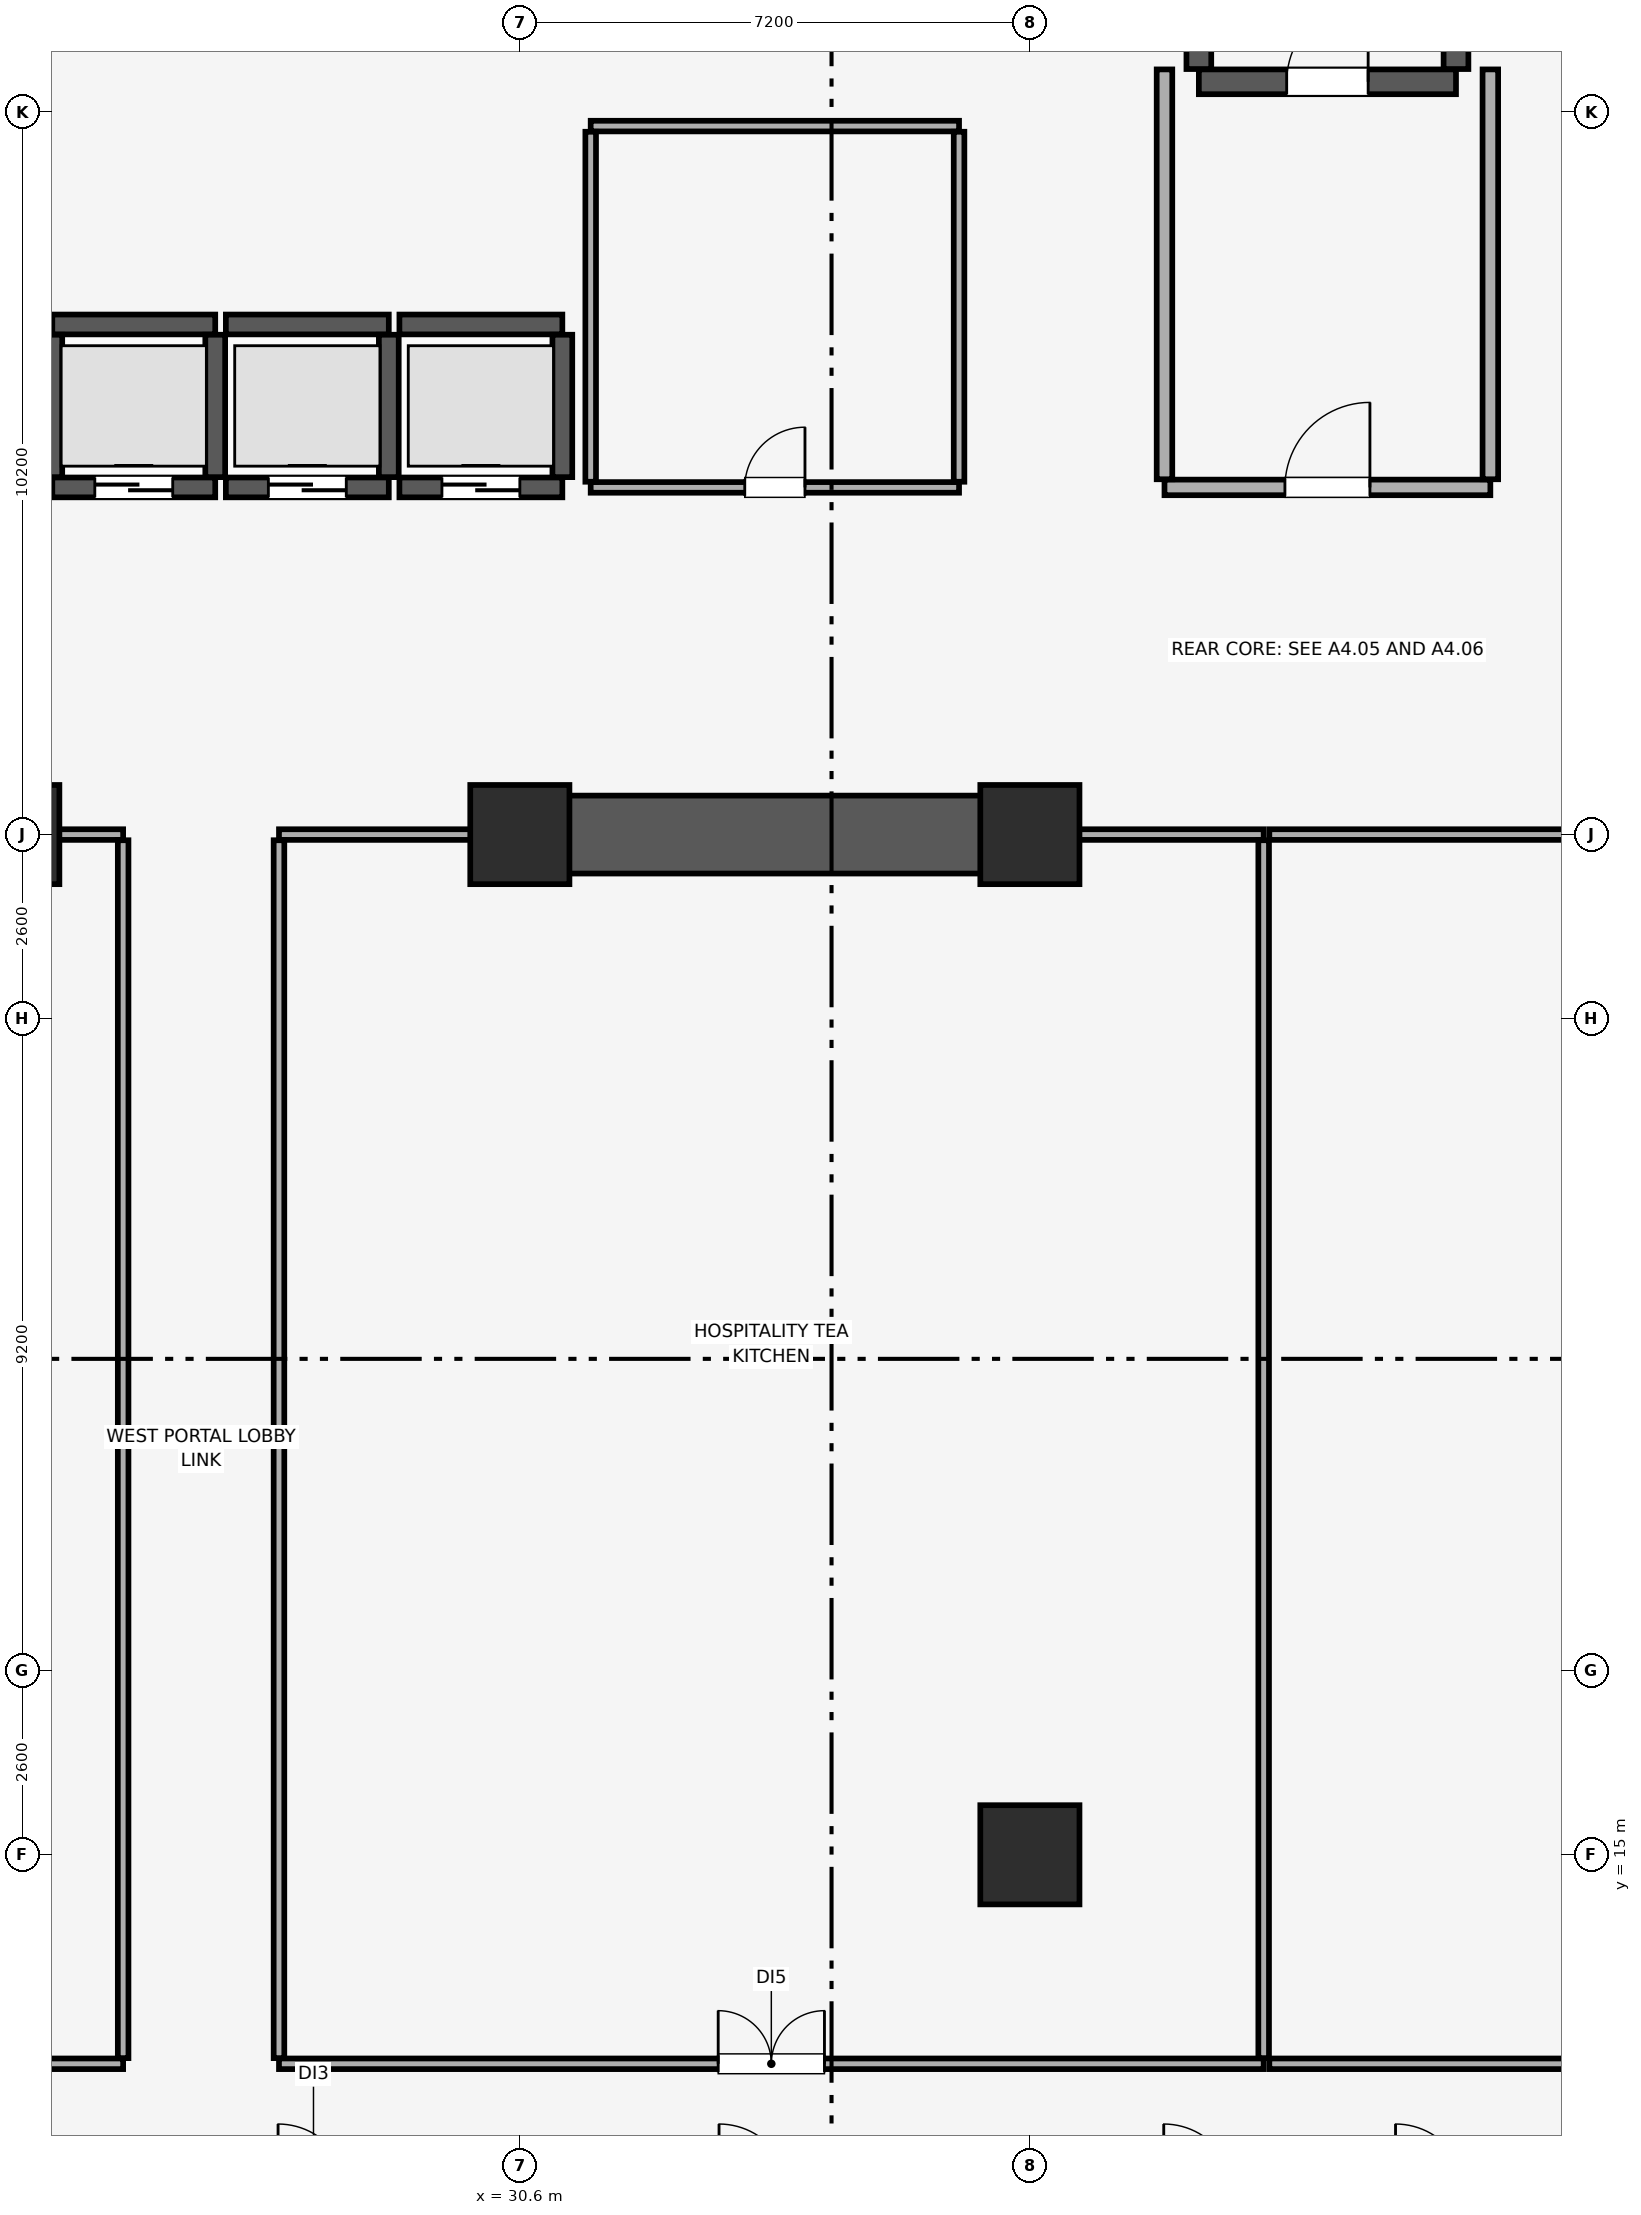
"""IFC4 building model, lengths in metres.
Left out: names, types, materials, properties, quantities, classifications, styles, units other than length and angle.
Written with IfcOpenShell. Run it as: python <this file> out.ifc"""

import sys

from ifc_helpers import new_model, si_unit, direction, frame, frame_2d, origin, origin_2d, place, context, subcontext, project, spatial, rectangle, extrude, element, fill, save


model = new_model("IFC4")
c1 = context("Model", 3, precision=1e-05, world=origin(), true_north=direction((0.0, 1.0)))
c2 = subcontext(c1, "Body", "Model", "MODEL_VIEW")
j1 = project(units=[si_unit("LENGTHUNIT", "METRE"), si_unit("PLANEANGLEUNIT", "RADIAN")], contexts=[c1])
p1 = place(None, origin())
s1 = spatial("IfcSite", under=j1, at=p1, CompositionType="ELEMENT")
p2 = place(p1, origin())
s2 = spatial("IfcBuilding", under=s1, at=p2, CompositionType="ELEMENT")
p3 = place(p2, frame((0.0, 0.0, 46.4)))
s3 = spatial("IfcBuildingStorey", under=s2, at=p3, CompositionType="ELEMENT", Elevation=46.4)
for number, where, z_axis, x_axis in (
    (1, (37.8, 15.0, 0.0), (0.0, 0.0, 1.0), (1.0, 0.0, 0.0)),
    (2, (23.4, 29.4, 0.0), (0.0, 0.0, 1.0), (1.0, 0.0, 0.0)),
    (3, (30.6, 29.4, 0.0), (0.0, 0.0, 1.0), (1.0, 0.0, 0.0)),
    (4, (37.8, 29.4, 0.0), (0.0, 0.0, 1.0), (1.0, 0.0, 0.0)),
):
    element("IfcColumn", number, at=place(p3, frame(where, z_axis=z_axis, x_axis=x_axis)), inside=s3, PredefinedType="COLUMN", context=c2, shape_type="SweptSolid", body=[
        extrude(rectangle(XDim=1.4, YDim=1.4, at=origin_2d()), origin(), (0.0, 0.0, 1.0), 3.51),
    ])
p4 = place(p3, frame((30.4, 29.4, 0.0), z_axis=(0.0, 0.0, 1.0), x_axis=(1.0, 0.0, 0.0)))
e5 = element("IfcWall", 5, at=p4, inside=s3, PredefinedType="SHEAR", context=c2, shape_type="SweptSolid", body=[
    extrude(rectangle(XDim=7.6, YDim=1.1, at=frame_2d((3.8, 0.0))), origin(), (0.0, 0.0, 1.0), 3.51),
])
p5 = place(p3, frame((40.185, 40.025, 0.0), z_axis=(0.0, 0.0, 1.0), x_axis=(1.0, 0.0, 0.0)))
e6 = element("IfcWall", 6, at=p5, inside=s3, PredefinedType="SHEAR", context=c2, shape_type="SweptSolid", body=[
    extrude(rectangle(XDim=3.63, YDim=0.35, at=frame_2d((1.815, 0.0))), origin(), (0.0, 0.0, 1.0), 3.51),
])
p6 = place(p5, frame((1.24, 0.0, 0.0)))
e7 = element("IfcOpeningElement", 7, at=p6, cuts=e6, PredefinedType="OPENING", context=c2, shape_type="SweptSolid", body=[
    extrude(rectangle(XDim=1.15, YDim=2.15, at=frame_2d((0.575, 1.075))), frame((0.0, 0.185, 0.0), z_axis=(0.0, -1.0, 0.0), x_axis=(1.0, 0.0, 0.0)), (0.0, 0.0, 1.0), 0.37),
])
for number, where, z_axis, x_axis in (
    (8, (40.185, 40.205, 0.0), (0.0, 0.0, 1.0), (0.0, 1.0, 0.0)),
    (9, (43.815, 40.205, 0.0), (0.0, 0.0, 1.0), (0.0, 1.0, 0.0)),
):
    element("IfcWall", number, at=place(p3, frame(where, z_axis=z_axis, x_axis=x_axis)), inside=s3, PredefinedType="SHEAR", context=c2, shape_type="SweptSolid", body=[
        extrude(rectangle(XDim=8.09, YDim=0.35, at=frame_2d((4.045, 0.0))), origin(), (0.0, 0.0, 1.0), 3.51),
    ])
p7 = place(p3, frame((24.0, 34.3, 0.0), z_axis=(0.0, 0.0, 1.0), x_axis=(1.0, 0.0, 0.0)))
e10 = element("IfcWall", 10, at=p7, inside=s3, PredefinedType="SHEAR", context=c2, shape_type="SweptSolid", body=[
    extrude(rectangle(XDim=2.3, YDim=0.28, at=frame_2d((1.15, 0.0))), origin(), (0.0, 0.0, 1.0), 3.51),
])
p8 = place(p7, frame((0.6, 0.0, 0.0)))
e11 = element("IfcOpeningElement", 11, at=p8, cuts=e10, PredefinedType="OPENING", context=c2, shape_type="SweptSolid", body=[
    extrude(rectangle(XDim=1.1, YDim=2.2, at=frame_2d((0.55, 1.1))), frame((0.0, 0.15, 0.0), z_axis=(0.0, -1.0, 0.0), x_axis=(1.0, 0.0, 0.0)), (0.0, 0.0, 1.0), 0.3),
])
p9 = place(p3, frame((24.0, 36.6, 0.0), z_axis=(0.0, 0.0, 1.0), x_axis=(1.0, 0.0, 0.0)))
e12 = element("IfcWall", 12, at=p9, inside=s3, PredefinedType="SHEAR", context=c2, shape_type="SweptSolid", body=[
    extrude(rectangle(XDim=2.3, YDim=0.28, at=frame_2d((1.15, 0.0))), origin(), (0.0, 0.0, 1.0), 3.51),
])
for number, where, z_axis, x_axis in (
    (13, (24.0, 34.445, 0.0), (0.0, 0.0, 1.0), (0.0, 1.0, 0.0)),
    (14, (26.3, 34.445, 0.0), (0.0, 0.0, 1.0), (0.0, 1.0, 0.0)),
):
    element("IfcWall", number, at=place(p3, frame(where, z_axis=z_axis, x_axis=x_axis)), inside=s3, PredefinedType="SHEAR", context=c2, shape_type="SweptSolid", body=[
        extrude(rectangle(XDim=2.01, YDim=0.28, at=frame_2d((1.005, 0.0))), origin(), (0.0, 0.0, 1.0), 3.51),
    ])
p10 = place(p3, frame((26.45, 34.3, 0.0), z_axis=(0.0, 0.0, 1.0), x_axis=(1.0, 0.0, 0.0)))
e15 = element("IfcWall", 15, at=p10, inside=s3, PredefinedType="SHEAR", context=c2, shape_type="SweptSolid", body=[
    extrude(rectangle(XDim=2.3, YDim=0.28, at=frame_2d((1.15, 0.0))), origin(), (0.0, 0.0, 1.0), 3.51),
])
p11 = place(p10, frame((0.6, 0.0, 0.0)))
e16 = element("IfcOpeningElement", 16, at=p11, cuts=e15, PredefinedType="OPENING", context=c2, shape_type="SweptSolid", body=[
    extrude(rectangle(XDim=1.1, YDim=2.2, at=frame_2d((0.55, 1.1))), frame((0.0, 0.15, 0.0), z_axis=(0.0, -1.0, 0.0), x_axis=(1.0, 0.0, 0.0)), (0.0, 0.0, 1.0), 0.3),
])
p12 = place(p3, frame((26.45, 36.6, 0.0), z_axis=(0.0, 0.0, 1.0), x_axis=(1.0, 0.0, 0.0)))
e17 = element("IfcWall", 17, at=p12, inside=s3, PredefinedType="SHEAR", context=c2, shape_type="SweptSolid", body=[
    extrude(rectangle(XDim=2.3, YDim=0.28, at=frame_2d((1.15, 0.0))), origin(), (0.0, 0.0, 1.0), 3.51),
])
p13 = place(p3, frame((28.75, 34.445, 0.0), z_axis=(0.0, 0.0, 1.0), x_axis=(0.0, 1.0, 0.0)))
e18 = element("IfcWall", 18, at=p13, inside=s3, PredefinedType="SHEAR", context=c2, shape_type="SweptSolid", body=[
    extrude(rectangle(XDim=2.01, YDim=0.28, at=frame_2d((1.005, 0.0))), origin(), (0.0, 0.0, 1.0), 3.51),
])
p14 = place(p3, frame((28.9, 34.3, 0.0), z_axis=(0.0, 0.0, 1.0), x_axis=(1.0, 0.0, 0.0)))
e19 = element("IfcWall", 19, at=p14, inside=s3, PredefinedType="SHEAR", context=c2, shape_type="SweptSolid", body=[
    extrude(rectangle(XDim=2.3, YDim=0.28, at=frame_2d((1.15, 0.0))), origin(), (0.0, 0.0, 1.0), 3.51),
])
p15 = place(p14, frame((0.6, 0.0, 0.0)))
e20 = element("IfcOpeningElement", 20, at=p15, cuts=e19, PredefinedType="OPENING", context=c2, shape_type="SweptSolid", body=[
    extrude(rectangle(XDim=1.1, YDim=2.2, at=frame_2d((0.55, 1.1))), frame((0.0, 0.15, 0.0), z_axis=(0.0, -1.0, 0.0), x_axis=(1.0, 0.0, 0.0)), (0.0, 0.0, 1.0), 0.3),
])
p16 = place(p3, frame((28.9, 36.6, 0.0), z_axis=(0.0, 0.0, 1.0), x_axis=(1.0, 0.0, 0.0)))
e21 = element("IfcWall", 21, at=p16, inside=s3, PredefinedType="SHEAR", context=c2, shape_type="SweptSolid", body=[
    extrude(rectangle(XDim=2.3, YDim=0.28, at=frame_2d((1.15, 0.0))), origin(), (0.0, 0.0, 1.0), 3.51),
])
p17 = place(p3, frame((31.2, 34.445, 0.0), z_axis=(0.0, 0.0, 1.0), x_axis=(0.0, 1.0, 0.0)))
e22 = element("IfcWall", 22, at=p17, inside=s3, PredefinedType="SHEAR", context=c2, shape_type="SweptSolid", body=[
    extrude(rectangle(XDim=2.01, YDim=0.28, at=frame_2d((1.005, 0.0))), origin(), (0.0, 0.0, 1.0), 3.51),
])
p18 = place(p3, frame((39.7, 34.3, 0.0), z_axis=(0.0, 0.0, 1.0), x_axis=(1.0, 0.0, 0.0)))
e23 = element("IfcWall", 23, at=p18, inside=s3, PredefinedType="PARTITIONING", context=c2, shape_type="SweptSolid", body=[
    extrude(rectangle(XDim=4.6, YDim=0.22, at=frame_2d((2.3, 0.0))), origin(), (0.0, 0.0, 1.0), 3.51),
])
p19 = place(p18, frame((1.7, 0.0, 0.0)))
e24 = element("IfcOpeningElement", 24, at=p19, cuts=e23, PredefinedType="OPENING", context=c2, shape_type="SweptSolid", body=[
    extrude(rectangle(XDim=1.2, YDim=2.15, at=frame_2d((0.6, 1.075))), frame((0.0, 0.12, 0.0), z_axis=(0.0, -1.0, 0.0), x_axis=(1.0, 0.0, 0.0)), (0.0, 0.0, 1.0), 0.24),
])
for number, where, z_axis, x_axis in (
    (25, (39.7, 34.415, 0.0), (0.0, 0.0, 1.0), (0.0, 1.0, 0.0)),
    (26, (44.3, 34.415, 0.0), (0.0, 0.0, 1.0), (0.0, 1.0, 0.0)),
):
    element("IfcWall", number, at=place(p3, frame(where, z_axis=z_axis, x_axis=x_axis)), inside=s3, PredefinedType="PARTITIONING", context=c2, shape_type="SweptSolid", body=[
        extrude(rectangle(XDim=5.785, YDim=0.22, at=frame_2d((2.893, 0.0))), origin(), (0.0, 0.0, 1.0), 3.51),
    ])
p20 = place(p3, frame((31.6, 34.3, 0.0), z_axis=(0.0, 0.0, 1.0), x_axis=(1.0, 0.0, 0.0)))
e27 = element("IfcWall", 27, at=p20, inside=s3, PredefinedType="PARTITIONING", context=c2, shape_type="SweptSolid", body=[
    extrude(rectangle(XDim=5.2, YDim=0.15, at=frame_2d((2.6, 0.0))), origin(), (0.0, 0.0, 1.0), 3.51),
])
p21 = place(p20, frame((2.175, 0.0, 0.0)))
e28 = element("IfcOpeningElement", 28, at=p21, cuts=e27, PredefinedType="OPENING", context=c2, shape_type="SweptSolid", body=[
    extrude(rectangle(XDim=0.85, YDim=2.1, at=frame_2d((0.425, 1.05))), frame((0.0, 0.085, 0.0), z_axis=(0.0, -1.0, 0.0), x_axis=(1.0, 0.0, 0.0)), (0.0, 0.0, 1.0), 0.17),
])
p22 = place(p3, frame((31.6, 39.4, 0.0), z_axis=(0.0, 0.0, 1.0), x_axis=(1.0, 0.0, 0.0)))
e29 = element("IfcWall", 29, at=p22, inside=s3, PredefinedType="PARTITIONING", context=c2, shape_type="SweptSolid", body=[
    extrude(rectangle(XDim=5.2, YDim=0.15, at=frame_2d((2.6, 0.0))), origin(), (0.0, 0.0, 1.0), 3.51),
])
for number, where, z_axis, x_axis in (
    (30, (31.6, 34.38, 0.0), (0.0, 0.0, 1.0), (0.0, 1.0, 0.0)),
    (31, (36.8, 34.38, 0.0), (0.0, 0.0, 1.0), (0.0, 1.0, 0.0)),
):
    element("IfcWall", number, at=place(p3, frame(where, z_axis=z_axis, x_axis=x_axis)), inside=s3, PredefinedType="PARTITIONING", context=c2, shape_type="SweptSolid", body=[
        extrude(rectangle(XDim=4.94, YDim=0.15, at=frame_2d((2.47, 0.0))), origin(), (0.0, 0.0, 1.0), 3.51),
    ])
p23 = place(p3, frame((15.8, 12.05, 0.0), z_axis=(0.0, 0.0, 1.0), x_axis=(1.0, 0.0, 0.0)))
e32 = element("IfcWall", 32, at=p23, inside=s3, PredefinedType="PARTITIONING", context=c2, shape_type="SweptSolid", body=[
    extrude(rectangle(XDim=9.2, YDim=0.15, at=frame_2d((4.6, 0.0))), origin(), (0.0, 0.0, 1.0), 3.51),
])
p24 = place(p23, frame((4.1, 0.0, 0.0)))
e33 = element("IfcOpeningElement", 33, at=p24, cuts=e32, PredefinedType="OPENING", context=c2, shape_type="SweptSolid", body=[
    extrude(rectangle(XDim=1.0, YDim=2.15, at=frame_2d((0.5, 1.075))), frame((0.0, 0.085, 0.0), z_axis=(0.0, -1.0, 0.0), x_axis=(1.0, 0.0, 0.0)), (0.0, 0.0, 1.0), 0.17),
])
p25 = place(p3, frame((23.61, 29.4, 0.0), z_axis=(0.0, 0.0, 1.0), x_axis=(1.0, 0.0, 0.0)))
e34 = element("IfcWall", 34, at=p25, inside=s3, PredefinedType="PARTITIONING", context=c2, shape_type="SweptSolid", body=[
    extrude(rectangle(XDim=1.39, YDim=0.15, at=frame_2d((0.695, 0.0))), origin(), (0.0, 0.0, 1.0), 2.41),
])
p26 = place(p3, frame((25.0, 12.13, 0.0), z_axis=(0.0, 0.0, 1.0), x_axis=(0.0, 1.0, 0.0)))
e35 = element("IfcWall", 35, at=p26, inside=s3, PredefinedType="PARTITIONING", context=c2, shape_type="SweptSolid", body=[
    extrude(rectangle(XDim=17.19, YDim=0.15, at=frame_2d((8.595, 0.0))), origin(), (0.0, 0.0, 1.0), 3.51),
])
p27 = place(p3, frame((27.2, 12.05, 0.0), z_axis=(0.0, 0.0, 1.0), x_axis=(1.0, 0.0, 0.0)))
e36 = element("IfcWall", 36, at=p27, inside=s3, PredefinedType="PARTITIONING", context=c2, shape_type="SweptSolid", body=[
    extrude(rectangle(XDim=13.9, YDim=0.15, at=frame_2d((6.95, 0.0))), origin(), (0.0, 0.0, 1.0), 3.51),
])
p28 = place(p27, frame((6.2, 0.0, 0.0)))
e37 = element("IfcOpeningElement", 37, at=p28, cuts=e36, PredefinedType="OPENING", context=c2, shape_type="SweptSolid", body=[
    extrude(rectangle(XDim=1.5, YDim=2.25, at=frame_2d((0.75, 1.125))), frame((0.0, 0.085, 0.0), z_axis=(0.0, -1.0, 0.0), x_axis=(1.0, 0.0, 0.0)), (0.0, 0.0, 1.0), 0.17),
])
p29 = place(p3, frame((27.2, 29.4, 0.0), z_axis=(0.0, 0.0, 1.0), x_axis=(1.0, 0.0, 0.0)))
e38 = element("IfcWall", 38, at=p29, inside=s3, PredefinedType="PARTITIONING", context=c2, shape_type="SweptSolid", body=[
    extrude(rectangle(XDim=3.19, YDim=0.15, at=frame_2d((1.595, 0.0))), origin(), (0.0, 0.0, 1.0), 2.41),
])
p30 = place(p3, frame((38.01, 29.4, 0.0), z_axis=(0.0, 0.0, 1.0), x_axis=(1.0, 0.0, 0.0)))
e39 = element("IfcWall", 39, at=p30, inside=s3, PredefinedType="PARTITIONING", context=c2, shape_type="SweptSolid", body=[
    extrude(rectangle(XDim=3.09, YDim=0.15, at=frame_2d((1.545, 0.0))), origin(), (0.0, 0.0, 1.0), 2.41),
])
p31 = place(p3, frame((27.2, 12.13, 0.0), z_axis=(0.0, 0.0, 1.0), x_axis=(0.0, 1.0, 0.0)))
e40 = element("IfcWall", 40, at=p31, inside=s3, PredefinedType="PARTITIONING", context=c2, shape_type="SweptSolid", body=[
    extrude(rectangle(XDim=17.19, YDim=0.15, at=frame_2d((8.595, 0.0))), origin(), (0.0, 0.0, 1.0), 2.898),
])
p32 = place(p3, frame((41.1, 12.13, 0.0), z_axis=(0.0, 0.0, 1.0), x_axis=(0.0, 1.0, 0.0)))
e41 = element("IfcWall", 41, at=p32, inside=s3, PredefinedType="PARTITIONING", context=c2, shape_type="SweptSolid", body=[
    extrude(rectangle(XDim=17.19, YDim=0.15, at=frame_2d((8.595, 0.0))), origin(), (0.0, 0.0, 1.0), 3.51),
])
p33 = place(p3, frame((41.18, 12.05, 0.0), z_axis=(0.0, 0.0, 1.0), x_axis=(1.0, 0.0, 0.0)))
e42 = element("IfcWall", 42, at=p33, inside=s3, PredefinedType="PARTITIONING", context=c2, shape_type="SweptSolid", body=[
    extrude(rectangle(XDim=15.62, YDim=0.15, at=frame_2d((7.81, 0.0))), origin(), (0.0, 0.0, 1.0), 3.51),
])
p34 = place(p33, frame((7.02, 0.0, 0.0)))
e43 = element("IfcOpeningElement", 43, at=p34, cuts=e42, PredefinedType="OPENING", context=c2, shape_type="SweptSolid", body=[
    extrude(rectangle(XDim=1.5, YDim=2.25, at=frame_2d((0.75, 1.125))), frame((0.0, 0.085, 0.0), z_axis=(0.0, -1.0, 0.0), x_axis=(1.0, 0.0, 0.0)), (0.0, 0.0, 1.0), 0.17),
])
p35 = place(p3, frame((41.18, 29.4, 0.0), z_axis=(0.0, 0.0, 1.0), x_axis=(1.0, 0.0, 0.0)))
e44 = element("IfcWall", 44, at=p35, inside=s3, PredefinedType="PARTITIONING", context=c2, shape_type="SweptSolid", body=[
    extrude(rectangle(XDim=4.81, YDim=0.15, at=frame_2d((2.405, 0.0))), origin(), (0.0, 0.0, 1.0), 2.41),
])
p36 = place(p6, origin())
e45 = element("IfcDoor", 45, at=p36, inside=s3, OperationType="SINGLE_SWING_RIGHT", PredefinedType="DOOR", context=c2, shape_type="SweptSolid", body=[
    extrude(rectangle(XDim=1.15, YDim=2.15, at=frame_2d((0.575, 1.075))), frame((0.0, 0.025, 0.0), z_axis=(0.0, -1.0, 0.0), x_axis=(1.0, 0.0, 0.0)), (0.0, 0.0, 1.0), 0.05),
])
fill(e7, e45)
p37 = place(p8, origin())
e46 = element("IfcDoor", 46, at=p37, inside=s3, OperationType="DOUBLE_DOOR_SLIDING", PredefinedType="DOOR", context=c2, shape_type="SweptSolid", body=[
    extrude(rectangle(XDim=1.1, YDim=2.2, at=frame_2d((0.55, 1.1))), frame((0.0, 0.025, 0.0), z_axis=(0.0, -1.0, 0.0), x_axis=(1.0, 0.0, 0.0)), (0.0, 0.0, 1.0), 0.05),
])
fill(e11, e46)
p38 = place(p11, origin())
e47 = element("IfcDoor", 47, at=p38, inside=s3, OperationType="DOUBLE_DOOR_SLIDING", PredefinedType="DOOR", context=c2, shape_type="SweptSolid", body=[
    extrude(rectangle(XDim=1.1, YDim=2.2, at=frame_2d((0.55, 1.1))), frame((0.0, 0.025, 0.0), z_axis=(0.0, -1.0, 0.0), x_axis=(1.0, 0.0, 0.0)), (0.0, 0.0, 1.0), 0.05),
])
fill(e16, e47)
p39 = place(p15, origin())
e48 = element("IfcDoor", 48, at=p39, inside=s3, OperationType="DOUBLE_DOOR_SLIDING", PredefinedType="DOOR", context=c2, shape_type="SweptSolid", body=[
    extrude(rectangle(XDim=1.1, YDim=2.2, at=frame_2d((0.55, 1.1))), frame((0.0, 0.025, 0.0), z_axis=(0.0, -1.0, 0.0), x_axis=(1.0, 0.0, 0.0)), (0.0, 0.0, 1.0), 0.05),
])
fill(e20, e48)
p40 = place(p19, origin())
e49 = element("IfcDoor", 49, at=p40, inside=s3, OperationType="SINGLE_SWING_RIGHT", PredefinedType="DOOR", context=c2, shape_type="SweptSolid", body=[
    extrude(rectangle(XDim=1.2, YDim=2.15, at=frame_2d((0.6, 1.075))), frame((0.0, 0.025, 0.0), z_axis=(0.0, -1.0, 0.0), x_axis=(1.0, 0.0, 0.0)), (0.0, 0.0, 1.0), 0.05),
])
fill(e24, e49)
p41 = place(p21, origin())
e50 = element("IfcDoor", 50, at=p41, inside=s3, OperationType="SINGLE_SWING_RIGHT", PredefinedType="DOOR", context=c2, shape_type="SweptSolid", body=[
    extrude(rectangle(XDim=0.85, YDim=2.1, at=frame_2d((0.425, 1.05))), frame((0.0, 0.025, 0.0), z_axis=(0.0, -1.0, 0.0), x_axis=(1.0, 0.0, 0.0)), (0.0, 0.0, 1.0), 0.05),
])
fill(e28, e50)
p42 = place(p28, origin())
e51 = element("IfcDoor", 51, at=p42, inside=s3, OperationType="DOUBLE_DOOR_SINGLE_SWING", PredefinedType="DOOR", context=c2, shape_type="SweptSolid", body=[
    extrude(rectangle(XDim=1.5, YDim=2.25, at=frame_2d((0.75, 1.125))), frame((0.0, 0.025, 0.0), z_axis=(0.0, -1.0, 0.0), x_axis=(1.0, 0.0, 0.0)), (0.0, 0.0, 1.0), 0.05),
])
fill(e37, e51)
save(model, sys.argv[1])
